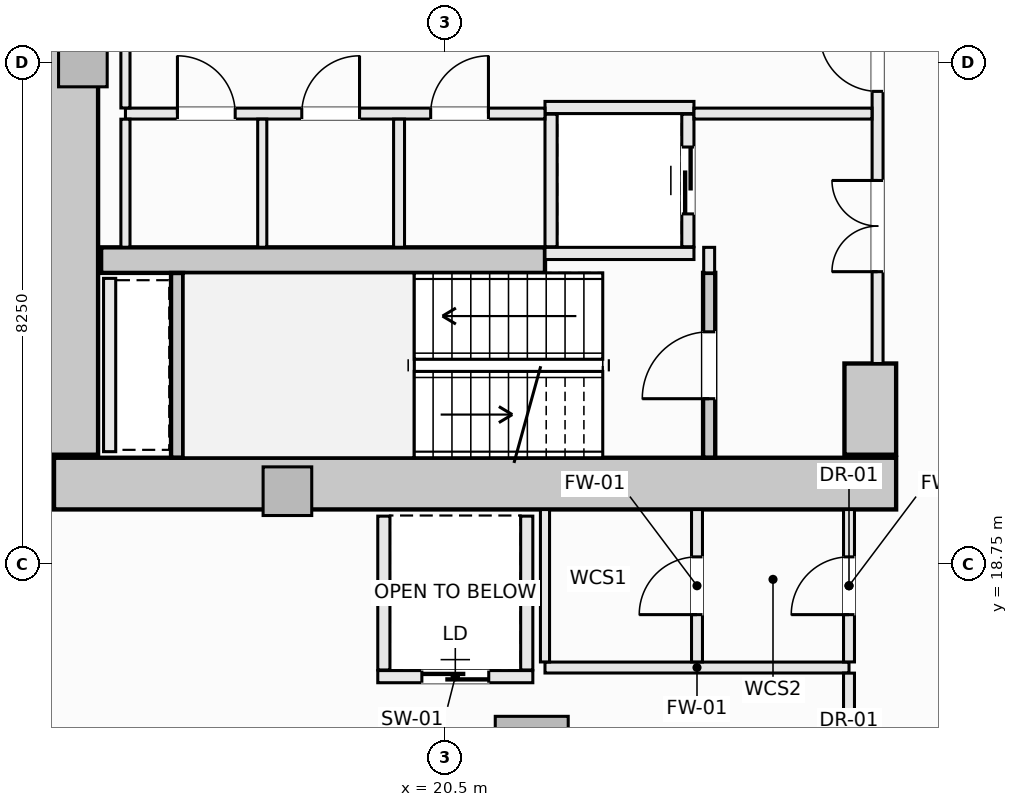
"""IFC4 building model, lengths in metres.
Left out: names, types, materials, properties, quantities, classifications, styles, units other than length and angle.
Written with IfcOpenShell. Run it as: python <this file> out.ifc"""

import sys

from ifc_helpers import new_model, si_unit, direction, frame, frame_2d, origin, origin_2d, place, context, subcontext, project, spatial, rectangle, extrude, element, fill, save


model = new_model("IFC4")
c1 = context("Model", 3, precision=1e-05, world=origin(), true_north=direction((0.0, 1.0)))
c2 = subcontext(c1, "Body", "Model", "MODEL_VIEW")
j1 = project(units=[si_unit("LENGTHUNIT", "METRE"), si_unit("PLANEANGLEUNIT", "RADIAN")], contexts=[c1])
p1 = place(None, origin())
s1 = spatial("IfcSite", under=j1, at=p1, CompositionType="ELEMENT")
p2 = place(p1, origin())
s2 = spatial("IfcBuilding", under=s1, at=p2, CompositionType="ELEMENT")
p3 = place(p2, frame((0.0, 0.0, 72.7)))
s3 = spatial("IfcBuildingStorey", under=s2, at=p3, CompositionType="ELEMENT", Elevation=72.7)
p4 = place(p3, frame((14.075, 20.075, -0.28), z_axis=(0.0, 0.0, 1.0), x_axis=(1.0, 0.0, 0.0)))
e1 = element("IfcWall", 1, at=p4, inside=s3, PredefinedType="SHEAR", context=c2, shape_type="SweptSolid", body=[
    extrude(rectangle(XDim=13.85, YDim=0.85, at=frame_2d((6.925, 0.0))), origin(), (0.0, 0.0, 1.0), 3.85),
])
p5 = place(p3, frame((14.375, 20.55, -0.28), z_axis=(0.0, 0.0, 1.0), x_axis=(0.0, 1.0, 0.0)))
e2 = element("IfcWall", 2, at=p5, inside=s3, PredefinedType="SHEAR", context=c2, shape_type="SweptSolid", body=[
    extrude(rectangle(XDim=12.9, YDim=0.85, at=frame_2d((6.45, 0.0))), origin(), (0.0, 0.0, 1.0), 3.85),
])
p6 = place(p3, frame((27.5, 20.55, -0.28), z_axis=(0.0, 0.0, 1.0), x_axis=(0.0, 1.0, 0.0)))
e3 = element("IfcWall", 3, at=p6, inside=s3, PredefinedType="SHEAR", context=c2, shape_type="SweptSolid", body=[
    extrude(rectangle(XDim=1.5, YDim=0.85, at=frame_2d((0.75, 0.0))), origin(), (0.0, 0.0, 1.0), 3.85),
])
p7 = place(p3, frame((14.85, 23.75, -0.28), z_axis=(0.0, 0.0, 1.0), x_axis=(1.0, 0.0, 0.0)))
e4 = element("IfcWall", 4, at=p7, inside=s3, PredefinedType="SHEAR", context=c2, shape_type="SweptSolid", body=[
    extrude(rectangle(XDim=7.3, YDim=0.42, at=frame_2d((3.65, 0.0))), origin(), (0.0, 0.0, 1.0), 3.85),
])
p8 = place(p3, frame((21.932, 15.648, -0.28), z_axis=(0.0, 0.0, 1.0), x_axis=(1.0, 0.0, 0.0)))
e5 = element("IfcColumn", 5, at=p8, inside=s3, PredefinedType="COLUMN", context=c2, shape_type="SweptSolid", body=[
    extrude(rectangle(XDim=1.2, YDim=1.2, at=origin_2d()), origin(), (0.0, 0.0, 1.0), 3.85),
])
for number, where, z_axis, x_axis in (
    (6, (14.55, 27.0, -0.28), (0.0, 0.0, 1.0), (1.0, 0.0, 0.0)),
    (7, (17.914, 19.95, -0.28), (0.0, 0.0, 1.0), (1.0, 0.0, 0.0)),
):
    element("IfcColumn", number, at=place(p3, frame(where, z_axis=z_axis, x_axis=x_axis)), inside=s3, PredefinedType="PILASTER", context=c2, shape_type="SweptSolid", body=[
        extrude(rectangle(XDim=0.8, YDim=0.8, at=origin_2d()), origin(), (0.0, 0.0, 1.0), 3.85),
    ])
p9 = place(p3, frame((24.85, 20.502, -0.28), z_axis=(0.0, 0.0, 1.0), x_axis=(0.0, 1.0, 0.0)))
e8 = element("IfcWall", 8, at=p9, inside=s3, PredefinedType="SHEAR", context=c2, shape_type="SweptSolid", body=[
    extrude(rectangle(XDim=3.038, YDim=0.2, at=frame_2d((1.519, 0.0))), origin(), (0.0, 0.0, 1.0), 3.85),
])
p10 = place(p9, frame((0.969, 0.0, 0.28)))
e9 = element("IfcOpeningElement", 9, at=p10, cuts=e8, PredefinedType="OPENING", context=c2, shape_type="SweptSolid", body=[
    extrude(rectangle(XDim=1.1, YDim=2.15, at=frame_2d((0.55, 1.075))), frame((0.0, 0.11, 0.0), z_axis=(0.0, -1.0, 0.0), x_axis=(1.0, 0.0, 0.0)), (0.0, 0.0, 1.0), 0.22),
])
p11 = place(p3, frame((16.1, 20.502, -0.28), z_axis=(0.0, 0.0, 1.0), x_axis=(0.0, 1.0, 0.0)))
e10 = element("IfcWall", 10, at=p11, inside=s3, PredefinedType="SHEAR", context=c2, shape_type="SweptSolid", body=[
    extrude(rectangle(XDim=3.036, YDim=0.2, at=frame_2d((1.518, 0.0))), origin(), (0.0, 0.0, 1.0), 3.85),
])
for number, where, z_axis, x_axis in (
    (11, (22.15, 26.26, 0.0), (0.0, 0.0, 1.0), (1.0, 0.0, 0.0)),
    (12, (22.15, 23.86, 0.0), (0.0, 0.0, 1.0), (1.0, 0.0, 0.0)),
):
    element("IfcWall", number, at=place(p3, frame(where, z_axis=z_axis, x_axis=x_axis)), inside=s3, PredefinedType="SOLIDWALL", context=c2, shape_type="SweptSolid", body=[
        extrude(rectangle(XDim=2.45, YDim=0.2, at=frame_2d((1.225, 0.0))), origin(), (0.0, 0.0, 1.0), 3.57),
    ])
p12 = place(p3, frame((22.25, 23.97, 0.0), z_axis=(0.0, 0.0, 1.0), x_axis=(0.0, 1.0, 0.0)))
e13 = element("IfcWall", 13, at=p12, inside=s3, PredefinedType="SOLIDWALL", context=c2, shape_type="SweptSolid", body=[
    extrude(rectangle(XDim=2.18, YDim=0.2, at=frame_2d((1.09, 0.0))), origin(), (0.0, 0.0, 1.0), 3.57),
])
p13 = place(p3, frame((24.5, 23.97, 0.0), z_axis=(0.0, 0.0, 1.0), x_axis=(0.0, 1.0, 0.0)))
e14 = element("IfcWall", 14, at=p13, inside=s3, PredefinedType="SOLIDWALL", context=c2, shape_type="SweptSolid", body=[
    extrude(rectangle(XDim=2.18, YDim=0.2, at=frame_2d((1.09, 0.0))), origin(), (0.0, 0.0, 1.0), 3.57),
])
p14 = place(p13, frame((0.54, 0.0, 0.0)))
e15 = element("IfcOpeningElement", 15, at=p14, cuts=e14, PredefinedType="OPENING", context=c2, shape_type="SweptSolid", body=[
    extrude(rectangle(XDim=1.1, YDim=2.2, at=frame_2d((0.55, 1.1))), frame((0.0, 0.11, 0.0), z_axis=(0.0, -1.0, 0.0), x_axis=(1.0, 0.0, 0.0)), (0.0, 0.0, 1.0), 0.22),
])
p15 = place(p3, frame((19.4, 16.9, 0.0), z_axis=(0.0, 0.0, 1.0), x_axis=(1.0, 0.0, 0.0)))
e16 = element("IfcWall", 16, at=p15, inside=s3, PredefinedType="SOLIDWALL", context=c2, shape_type="SweptSolid", body=[
    extrude(rectangle(XDim=2.55, YDim=0.2, at=frame_2d((1.275, 0.0))), origin(), (0.0, 0.0, 1.0), 3.57),
])
p16 = place(p15, frame((0.725, 0.0, 0.0)))
e17 = element("IfcOpeningElement", 17, at=p16, cuts=e16, PredefinedType="OPENING", context=c2, shape_type="SweptSolid", body=[
    extrude(rectangle(XDim=1.1, YDim=2.2, at=frame_2d((0.55, 1.1))), frame((0.0, 0.11, 0.0), z_axis=(0.0, -1.0, 0.0), x_axis=(1.0, 0.0, 0.0)), (0.0, 0.0, 1.0), 0.22),
])
for number, where, z_axis, x_axis in (
    (18, (19.5, 17.01, 0.0), (0.0, 0.0, 1.0), (0.0, 1.0, 0.0)),
    (19, (21.85, 17.01, 0.0), (0.0, 0.0, 1.0), (0.0, 1.0, 0.0)),
):
    element("IfcWall", number, at=place(p3, frame(where, z_axis=z_axis, x_axis=x_axis)), inside=s3, PredefinedType="SOLIDWALL", context=c2, shape_type="SweptSolid", body=[
        extrude(rectangle(XDim=2.53, YDim=0.2, at=frame_2d((1.265, 0.0))), origin(), (0.0, 0.0, 1.0), 3.57),
    ])
p17 = place(p3, frame((14.99, 20.6, 0.0), z_axis=(0.0, 0.0, 1.0), x_axis=(0.0, 1.0, 0.0)))
e20 = element("IfcWall", 20, at=p17, inside=s3, PredefinedType="SOLIDWALL", context=c2, shape_type="SweptSolid", body=[
    extrude(rectangle(XDim=2.85, YDim=0.2, at=frame_2d((1.425, 0.0))), origin(), (0.0, 0.0, 1.0), 3.57),
])
p18 = place(p3, frame((24.85, 23.54, 0.0), z_axis=(0.0, 0.0, 1.0), x_axis=(0.0, 1.0, 0.0)))
e21 = element("IfcWall", 21, at=p18, inside=s3, PredefinedType="SOLIDWALL", context=c2, shape_type="SweptSolid", body=[
    extrude(rectangle(XDim=0.42, YDim=0.18, at=frame_2d((0.21, 0.0))), origin(), (0.0, 0.0, 1.0), 3.57),
])
p19 = place(p3, frame((27.62, 22.05, 0.0), z_axis=(0.0, 0.0, 1.0), x_axis=(0.0, 1.0, 0.0)))
e22 = element("IfcWall", 22, at=p19, inside=s3, PredefinedType="SOLIDWALL", context=c2, shape_type="SweptSolid", body=[
    extrude(rectangle(XDim=9.9, YDim=0.18, at=frame_2d((4.95, 0.0))), origin(), (0.0, 0.0, 1.0), 2.662),
])
p20 = place(p19, frame((4.475, 0.0, 0.0)))
e23 = element("IfcOpeningElement", 23, at=p20, cuts=e22, PredefinedType="OPENING", context=c2, shape_type="SweptSolid", body=[
    extrude(rectangle(XDim=0.95, YDim=2.1, at=frame_2d((0.475, 1.05))), frame((0.0, 0.1, 0.0), z_axis=(0.0, -1.0, 0.0), x_axis=(1.0, 0.0, 0.0)), (0.0, 0.0, 1.0), 0.2),
])
p21 = place(p19, frame((6.89, 0.0, 0.0)))
e24 = element("IfcOpeningElement", 24, at=p21, cuts=e22, PredefinedType="OPENING", context=c2, shape_type="SweptSolid", body=[
    extrude(rectangle(XDim=1.5, YDim=2.2, at=frame_2d((0.75, 1.1))), frame((0.0, 0.1, 0.0), z_axis=(0.0, -1.0, 0.0), x_axis=(1.0, 0.0, 0.0)), (0.0, 0.0, 1.0), 0.2),
])
p22 = place(p19, frame((1.51, 0.0, 0.0)))
e25 = element("IfcOpeningElement", 25, at=p22, cuts=e22, PredefinedType="OPENING", context=c2, shape_type="SweptSolid", body=[
    extrude(rectangle(XDim=1.5, YDim=2.2, at=frame_2d((0.75, 1.1))), frame((0.0, 0.1, 0.0), z_axis=(0.0, -1.0, 0.0), x_axis=(1.0, 0.0, 0.0)), (0.0, 0.0, 1.0), 0.2),
])
p23 = place(p3, frame((15.25, 26.16, 0.0), z_axis=(0.0, 0.0, 1.0), x_axis=(1.0, 0.0, 0.0)))
e26 = element("IfcWall", 26, at=p23, inside=s3, PredefinedType="SOLIDWALL", context=c2, shape_type="SweptSolid", body=[
    extrude(rectangle(XDim=6.9, YDim=0.18, at=frame_2d((3.45, 0.0))), origin(), (0.0, 0.0, 1.0), 3.57),
])
p24 = place(p23, frame((5.02, 0.0, 0.0)))
e27 = element("IfcOpeningElement", 27, at=p24, cuts=e26, PredefinedType="OPENING", context=c2, shape_type="SweptSolid", body=[
    extrude(rectangle(XDim=0.95, YDim=2.1, at=frame_2d((0.475, 1.05))), frame((0.0, 0.1, 0.0), z_axis=(0.0, -1.0, 0.0), x_axis=(1.0, 0.0, 0.0)), (0.0, 0.0, 1.0), 0.2),
])
p25 = place(p23, frame((0.855, 0.0, 0.0)))
e28 = element("IfcOpeningElement", 28, at=p25, cuts=e26, PredefinedType="OPENING", context=c2, shape_type="SweptSolid", body=[
    extrude(rectangle(XDim=0.95, YDim=2.1, at=frame_2d((0.475, 1.05))), frame((0.0, 0.1, 0.0), z_axis=(0.0, -1.0, 0.0), x_axis=(1.0, 0.0, 0.0)), (0.0, 0.0, 1.0), 0.2),
])
p26 = place(p23, frame((2.9, 0.0, 0.0)))
e29 = element("IfcOpeningElement", 29, at=p26, cuts=e26, PredefinedType="OPENING", context=c2, shape_type="SweptSolid", body=[
    extrude(rectangle(XDim=0.95, YDim=2.1, at=frame_2d((0.475, 1.05))), frame((0.0, 0.1, 0.0), z_axis=(0.0, -1.0, 0.0), x_axis=(1.0, 0.0, 0.0)), (0.0, 0.0, 1.0), 0.2),
])
p27 = place(p3, frame((24.6, 26.16, 0.0), z_axis=(0.0, 0.0, 1.0), x_axis=(1.0, 0.0, 0.0)))
e30 = element("IfcWall", 30, at=p27, inside=s3, PredefinedType="SOLIDWALL", context=c2, shape_type="SweptSolid", body=[
    extrude(rectangle(XDim=2.928, YDim=0.18, at=frame_2d((1.464, 0.0))), origin(), (0.0, 0.0, 1.0), 3.57),
])
p28 = place(p3, frame((15.25, 23.962, 0.0), z_axis=(0.0, 0.0, 1.0), x_axis=(0.0, 1.0, 0.0)))
e31 = element("IfcWall", 31, at=p28, inside=s3, PredefinedType="PARTITIONING", context=c2, shape_type="SweptSolid", body=[
    extrude(rectangle(XDim=2.106, YDim=0.15, at=frame_2d((1.053, 0.0))), origin(), (0.0, 0.0, 1.0), 3.57),
])
p29 = place(p3, frame((15.25, 26.252, 0.0), z_axis=(0.0, 0.0, 1.0), x_axis=(0.0, 1.0, 0.0)))
e32 = element("IfcWall", 32, at=p29, inside=s3, PredefinedType="PARTITIONING", context=c2, shape_type="SweptSolid", body=[
    extrude(rectangle(XDim=1.496, YDim=0.15, at=frame_2d((0.748, 0.0))), origin(), (0.0, 0.0, 1.0), 3.57),
])
p30 = place(p3, frame((19.75, 23.962, 0.0), z_axis=(0.0, 0.0, 1.0), x_axis=(0.0, 1.0, 0.0)))
e33 = element("IfcWall", 33, at=p30, inside=s3, PredefinedType="SOLIDWALL", context=c2, shape_type="SweptSolid", body=[
    extrude(rectangle(XDim=2.106, YDim=0.18, at=frame_2d((1.053, 0.0))), origin(), (0.0, 0.0, 1.0), 3.57),
])
p31 = place(p3, frame((17.5, 23.962, 0.0), z_axis=(0.0, 0.0, 1.0), x_axis=(0.0, 1.0, 0.0)))
e34 = element("IfcWall", 34, at=p31, inside=s3, PredefinedType="PARTITIONING", context=c2, shape_type="SweptSolid", body=[
    extrude(rectangle(XDim=2.106, YDim=0.15, at=frame_2d((1.053, 0.0))), origin(), (0.0, 0.0, 1.0), 3.57),
])
p32 = place(p3, frame((22.15, 17.05, 0.0), z_axis=(0.0, 0.0, 1.0), x_axis=(1.0, 0.0, 0.0)))
e35 = element("IfcWall", 35, at=p32, inside=s3, PredefinedType="SOLIDWALL", context=c2, shape_type="SweptSolid", body=[
    extrude(rectangle(XDim=5.0, YDim=0.18, at=frame_2d((2.5, 0.0))), origin(), (0.0, 0.0, 1.0), 3.57),
])
p33 = place(p3, frame((22.15, 17.142, 0.0), z_axis=(0.0, 0.0, 1.0), x_axis=(0.0, 1.0, 0.0)))
e36 = element("IfcWall", 36, at=p33, inside=s3, PredefinedType="PARTITIONING", context=c2, shape_type="SweptSolid", body=[
    extrude(rectangle(XDim=2.506, YDim=0.15, at=frame_2d((1.253, 0.0))), origin(), (0.0, 0.0, 1.0), 3.57),
])
p34 = place(p3, frame((24.65, 17.142, 0.0), z_axis=(0.0, 0.0, 1.0), x_axis=(0.0, 1.0, 0.0)))
e37 = element("IfcWall", 37, at=p34, inside=s3, PredefinedType="SOLIDWALL", context=c2, shape_type="SweptSolid", body=[
    extrude(rectangle(XDim=2.506, YDim=0.18, at=frame_2d((1.253, 0.0))), origin(), (0.0, 0.0, 1.0), 3.57),
])
p35 = place(p34, frame((0.778, 0.0, 0.0)))
e38 = element("IfcOpeningElement", 38, at=p35, cuts=e37, PredefinedType="OPENING", context=c2, shape_type="SweptSolid", body=[
    extrude(rectangle(XDim=0.95, YDim=2.1, at=frame_2d((0.475, 1.05))), frame((0.0, 0.1, 0.0), z_axis=(0.0, -1.0, 0.0), x_axis=(1.0, 0.0, 0.0)), (0.0, 0.0, 1.0), 0.2),
])
p36 = place(p3, frame((27.15, 11.75, 0.0), z_axis=(0.0, 0.0, 1.0), x_axis=(0.0, 1.0, 0.0)))
e39 = element("IfcWall", 39, at=p36, inside=s3, PredefinedType="SOLIDWALL", context=c2, shape_type="SweptSolid", body=[
    extrude(rectangle(XDim=5.208, YDim=0.18, at=frame_2d((2.604, 0.0))), origin(), (0.0, 0.0, 1.0), 3.57),
])
p37 = place(p36, frame((2.129, 0.0, 0.0)))
e40 = element("IfcOpeningElement", 40, at=p37, cuts=e39, PredefinedType="OPENING", context=c2, shape_type="SweptSolid", body=[
    extrude(rectangle(XDim=0.95, YDim=2.1, at=frame_2d((0.475, 1.05))), frame((0.0, 0.1, 0.0), z_axis=(0.0, -1.0, 0.0), x_axis=(1.0, 0.0, 0.0)), (0.0, 0.0, 1.0), 0.2),
])
p38 = place(p3, frame((27.15, 17.142, 0.0), z_axis=(0.0, 0.0, 1.0), x_axis=(0.0, 1.0, 0.0)))
e41 = element("IfcWall", 41, at=p38, inside=s3, PredefinedType="SOLIDWALL", context=c2, shape_type="SweptSolid", body=[
    extrude(rectangle(XDim=2.506, YDim=0.18, at=frame_2d((1.253, 0.0))), origin(), (0.0, 0.0, 1.0), 3.57),
])
p39 = place(p38, frame((0.778, 0.0, 0.0)))
e42 = element("IfcOpeningElement", 42, at=p39, cuts=e41, PredefinedType="OPENING", context=c2, shape_type="SweptSolid", body=[
    extrude(rectangle(XDim=0.95, YDim=2.1, at=frame_2d((0.475, 1.05))), frame((0.0, 0.1, 0.0), z_axis=(0.0, -1.0, 0.0), x_axis=(1.0, 0.0, 0.0)), (0.0, 0.0, 1.0), 0.2),
])
p40 = place(p10, origin())
e43 = element("IfcDoor", 43, at=p40, inside=s3, OperationType="SINGLE_SWING_LEFT", PredefinedType="DOOR", context=c2, shape_type="SweptSolid", body=[
    extrude(rectangle(XDim=1.1, YDim=2.15, at=frame_2d((0.55, 1.075))), frame((0.0, 0.025, 0.0), z_axis=(0.0, -1.0, 0.0), x_axis=(1.0, 0.0, 0.0)), (0.0, 0.0, 1.0), 0.05),
])
fill(e9, e43)
p41 = place(p14, origin())
e44 = element("IfcDoor", 44, at=p41, inside=s3, OperationType="SLIDING_TO_LEFT", PredefinedType="DOOR", context=c2, shape_type="SweptSolid", body=[
    extrude(rectangle(XDim=1.1, YDim=2.2, at=frame_2d((0.55, 1.1))), frame((0.0, 0.025, 0.0), z_axis=(0.0, -1.0, 0.0), x_axis=(1.0, 0.0, 0.0)), (0.0, 0.0, 1.0), 0.05),
])
fill(e15, e44)
p42 = place(p16, origin())
e45 = element("IfcDoor", 45, at=p42, inside=s3, OperationType="SLIDING_TO_LEFT", PredefinedType="DOOR", context=c2, shape_type="SweptSolid", body=[
    extrude(rectangle(XDim=1.1, YDim=2.2, at=frame_2d((0.55, 1.1))), frame((0.0, 0.025, 0.0), z_axis=(0.0, -1.0, 0.0), x_axis=(1.0, 0.0, 0.0)), (0.0, 0.0, 1.0), 0.05),
])
fill(e17, e45)
p43 = place(p20, origin())
e46 = element("IfcDoor", 46, at=p43, inside=s3, OperationType="SINGLE_SWING_RIGHT", PredefinedType="DOOR", context=c2, shape_type="SweptSolid", body=[
    extrude(rectangle(XDim=0.95, YDim=2.1, at=frame_2d((0.475, 1.05))), frame((0.0, 0.025, 0.0), z_axis=(0.0, -1.0, 0.0), x_axis=(1.0, 0.0, 0.0)), (0.0, 0.0, 1.0), 0.05),
])
fill(e23, e46)
p44 = place(p22, origin())
e47 = element("IfcDoor", 47, at=p44, inside=s3, OperationType="DOUBLE_DOOR_SINGLE_SWING", PredefinedType="DOOR", context=c2, shape_type="SweptSolid", body=[
    extrude(rectangle(XDim=1.5, YDim=2.2, at=frame_2d((0.75, 1.1))), frame((0.0, 0.025, 0.0), z_axis=(0.0, -1.0, 0.0), x_axis=(1.0, 0.0, 0.0)), (0.0, 0.0, 1.0), 0.05),
])
fill(e25, e47)
p45 = place(p24, origin())
e48 = element("IfcDoor", 48, at=p45, inside=s3, OperationType="SINGLE_SWING_RIGHT", PredefinedType="DOOR", context=c2, shape_type="SweptSolid", body=[
    extrude(rectangle(XDim=0.95, YDim=2.1, at=frame_2d((0.475, 1.05))), frame((0.0, 0.025, 0.0), z_axis=(0.0, -1.0, 0.0), x_axis=(1.0, 0.0, 0.0)), (0.0, 0.0, 1.0), 0.05),
])
fill(e27, e48)
p46 = place(p25, origin())
e49 = element("IfcDoor", 49, at=p46, inside=s3, OperationType="SINGLE_SWING_LEFT", PredefinedType="DOOR", context=c2, shape_type="SweptSolid", body=[
    extrude(rectangle(XDim=0.95, YDim=2.1, at=frame_2d((0.475, 1.05))), frame((0.0, 0.025, 0.0), z_axis=(0.0, -1.0, 0.0), x_axis=(1.0, 0.0, 0.0)), (0.0, 0.0, 1.0), 0.05),
])
fill(e28, e49)
p47 = place(p26, origin())
e50 = element("IfcDoor", 50, at=p47, inside=s3, OperationType="SINGLE_SWING_RIGHT", PredefinedType="DOOR", context=c2, shape_type="SweptSolid", body=[
    extrude(rectangle(XDim=0.95, YDim=2.1, at=frame_2d((0.475, 1.05))), frame((0.0, 0.025, 0.0), z_axis=(0.0, -1.0, 0.0), x_axis=(1.0, 0.0, 0.0)), (0.0, 0.0, 1.0), 0.05),
])
fill(e29, e50)
p48 = place(p39, origin())
e51 = element("IfcDoor", 51, at=p48, inside=s3, OperationType="SINGLE_SWING_LEFT", PredefinedType="DOOR", context=c2, shape_type="SweptSolid", body=[
    extrude(rectangle(XDim=0.95, YDim=2.1, at=frame_2d((0.475, 1.05))), frame((0.0, 0.025, 0.0), z_axis=(0.0, -1.0, 0.0), x_axis=(1.0, 0.0, 0.0)), (0.0, 0.0, 1.0), 0.05),
])
fill(e42, e51)
p49 = place(p35, origin())
e52 = element("IfcDoor", 52, at=p49, inside=s3, OperationType="SINGLE_SWING_LEFT", PredefinedType="DOOR", context=c2, shape_type="SweptSolid", body=[
    extrude(rectangle(XDim=0.95, YDim=2.1, at=frame_2d((0.475, 1.05))), frame((0.0, 0.025, 0.0), z_axis=(0.0, -1.0, 0.0), x_axis=(1.0, 0.0, 0.0)), (0.0, 0.0, 1.0), 0.05),
])
fill(e38, e52)
save(model, sys.argv[1])
